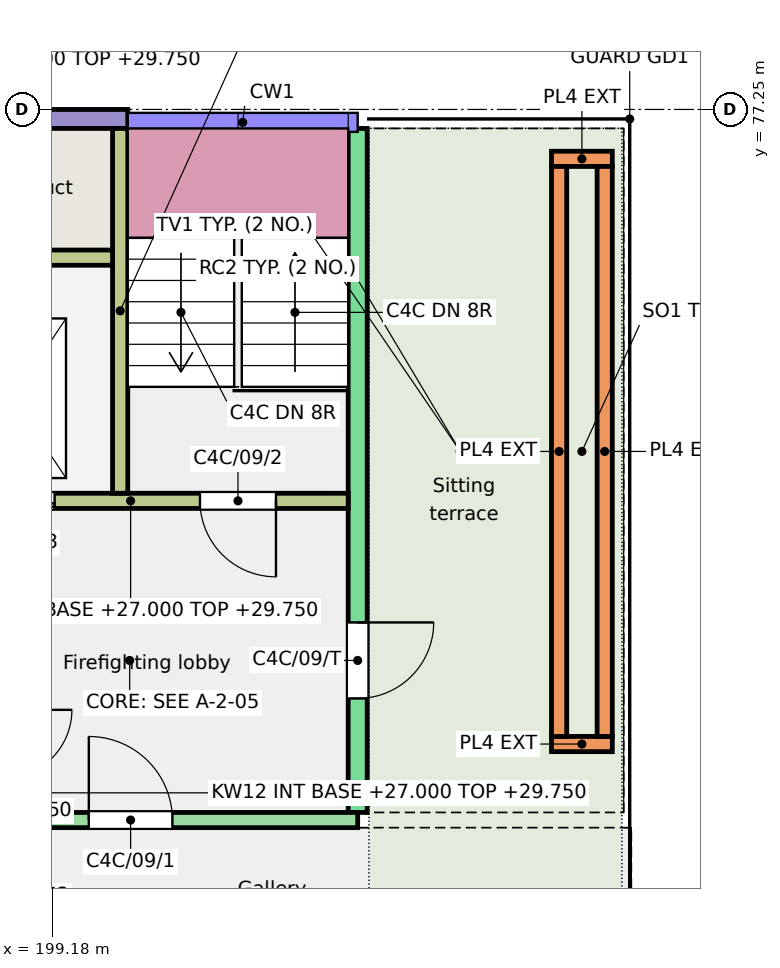
"""IFC4 building model, lengths in metres.
Left out: names, types, materials, properties, quantities, classifications, styles, units other than length and angle.
Written with IfcOpenShell. Run it as: python <this file> out.ifc"""

import sys

from ifc_helpers import new_model, si_unit, direction, frame, frame_2d, origin, place, context, subcontext, project, spatial, rectangle, extrude, element, fill, save


model = new_model("IFC4")
c1 = context("Model", 3, precision=1e-05, world=origin(), true_north=direction((0.0, 1.0)))
c2 = subcontext(c1, "Body", "Model", "MODEL_VIEW")
j1 = project(units=[si_unit("LENGTHUNIT", "METRE"), si_unit("PLANEANGLEUNIT", "RADIAN")], contexts=[c1])
p1 = place(None, origin())
s1 = spatial("IfcSite", under=j1, at=p1, CompositionType="ELEMENT")
p2 = place(p1, origin())
s2 = spatial("IfcBuilding", under=s1, at=p2, CompositionType="ELEMENT")
p3 = place(p2, frame((0.0, 0.0, 27.0)))
s3 = spatial("IfcBuildingStorey", under=s2, at=p3, CompositionType="ELEMENT", Elevation=27.0)
p4 = place(p3, frame((203.2, 68.0, 0.0), z_axis=(0.0, 0.0, 1.0), x_axis=(0.0, 1.0, 0.0)))
e1 = element("IfcWall", 1, at=p4, inside=s3, PredefinedType="SHEAR", context=c2, shape_type="SweptSolid", body=[
    extrude(rectangle(XDim=9.0, YDim=0.25, at=frame_2d((4.5, 0.0))), origin(), (0.0, 0.0, 1.0), 3.0),
])
p5 = place(p4, frame((1.5, 0.0, 0.0)))
e2 = element("IfcOpeningElement", 2, at=p5, cuts=e1, PredefinedType="OPENING", context=c2, shape_type="SweptSolid", body=[
    extrude(rectangle(XDim=1.0, YDim=2.1, at=frame_2d((0.5, 1.05))), frame((0.0, 0.135, 0.0), z_axis=(0.0, -1.0, 0.0), x_axis=(1.0, 0.0, 0.0)), (0.0, 0.0, 1.0), 0.27),
])
p6 = place(p3, frame((197.2, 77.125, 0.0), z_axis=(0.0, 0.0, 1.0), x_axis=(1.0, 0.0, 0.0)))
e3 = element("IfcWall", 3, at=p6, inside=s3, PredefinedType="SOLIDWALL", context=c2, shape_type="SweptSolid", body=[
    extrude(rectangle(XDim=2.975, YDim=0.25, at=frame_2d((1.488, 0.0))), origin(), (0.0, 0.0, 1.0), 3.0),
])
p7 = place(p3, frame((197.35, 67.9, 0.0), z_axis=(0.0, 0.0, 1.0), x_axis=(1.0, 0.0, 0.0)))
e4 = element("IfcWall", 4, at=p7, inside=s3, PredefinedType="SHEAR", context=c2, shape_type="SweptSolid", body=[
    extrude(rectangle(XDim=5.85, YDim=0.2, at=frame_2d((2.925, 0.0))), origin(), (0.0, 0.0, 1.0), 2.75),
])
p8 = place(p7, frame((2.312, 0.0, 0.0)))
e5 = element("IfcOpeningElement", 5, at=p8, cuts=e4, PredefinedType="OPENING", context=c2, shape_type="SweptSolid", body=[
    extrude(rectangle(XDim=1.1, YDim=2.1, at=frame_2d((0.55, 1.05))), frame((0.0, 0.11, 0.0), z_axis=(0.0, -1.0, 0.0), x_axis=(1.0, 0.0, 0.0)), (0.0, 0.0, 1.0), 0.22),
])
p9 = place(p3, frame((197.35, 72.1, 0.0), z_axis=(0.0, 0.0, 1.0), x_axis=(1.0, 0.0, 0.0)))
e6 = element("IfcWall", 6, at=p9, inside=s3, PredefinedType="SHEAR", context=c2, shape_type="SweptSolid", body=[
    extrude(rectangle(XDim=5.725, YDim=0.2, at=frame_2d((2.862, 0.0))), origin(), (0.0, 0.0, 1.0), 2.75),
])
p10 = place(p9, frame((3.775, 0.0, 0.0)))
e7 = element("IfcOpeningElement", 7, at=p10, cuts=e6, PredefinedType="OPENING", context=c2, shape_type="SweptSolid", body=[
    extrude(rectangle(XDim=1.0, YDim=2.1, at=frame_2d((0.5, 1.05))), frame((0.0, 0.11, 0.0), z_axis=(0.0, -1.0, 0.0), x_axis=(1.0, 0.0, 0.0)), (0.0, 0.0, 1.0), 0.22),
])
p11 = place(p9, frame((0.762, 0.0, 0.0)))
e8 = element("IfcOpeningElement", 8, at=p11, cuts=e6, PredefinedType="OPENING", context=c2, shape_type="SweptSolid", body=[
    extrude(rectangle(XDim=1.1, YDim=2.1, at=frame_2d((0.55, 1.05))), frame((0.0, 0.11, 0.0), z_axis=(0.0, -1.0, 0.0), x_axis=(1.0, 0.0, 0.0)), (0.0, 0.0, 1.0), 0.22),
])
p12 = place(p3, frame((200.075, 72.2, 0.0), z_axis=(0.0, 0.0, 1.0), x_axis=(0.0, 1.0, 0.0)))
e9 = element("IfcWall", 9, at=p12, inside=s3, PredefinedType="SHEAR", context=c2, shape_type="SweptSolid", body=[
    extrude(rectangle(XDim=4.8, YDim=0.2, at=frame_2d((2.4, 0.0))), origin(), (0.0, 0.0, 1.0), 2.75),
])
p13 = place(p3, frame((197.35, 75.3, 0.0), z_axis=(0.0, 0.0, 1.0), x_axis=(1.0, 0.0, 0.0)))
e10 = element("IfcWall", 10, at=p13, inside=s3, PredefinedType="SHEAR", context=c2, shape_type="SweptSolid", body=[
    extrude(rectangle(XDim=2.625, YDim=0.2, at=frame_2d((1.312, 0.0))), origin(), (0.0, 0.0, 1.0), 2.75),
])
for number, where, z_axis, x_axis in (
    (11, (205.75, 68.9, 0.01), (0.0, 0.0, 1.0), (1.0, 0.0, 0.0)),
    (12, (205.75, 76.6, 0.01), (0.0, 0.0, 1.0), (1.0, 0.0, 0.0)),
):
    element("IfcWall", number, at=place(p3, frame(where, z_axis=z_axis, x_axis=x_axis)), inside=s3, PredefinedType="SOLIDWALL", context=c2, shape_type="SweptSolid", body=[
        extrude(rectangle(XDim=0.8, YDim=0.2, at=frame_2d((0.4, 0.0))), origin(), (0.0, 0.0, 1.0), 0.45),
    ])
for number, where, z_axis, x_axis in (
    (13, (205.85, 69.0, 0.01), (0.0, 0.0, 1.0), (0.0, 1.0, 0.0)),
    (14, (206.45, 69.0, 0.01), (0.0, 0.0, 1.0), (0.0, 1.0, 0.0)),
):
    element("IfcWall", number, at=place(p3, frame(where, z_axis=z_axis, x_axis=x_axis)), inside=s3, PredefinedType="SOLIDWALL", context=c2, shape_type="SweptSolid", body=[
        extrude(rectangle(XDim=7.5, YDim=0.2, at=frame_2d((3.75, 0.0))), origin(), (0.0, 0.0, 1.0), 0.45),
    ])
p14 = place(p8, origin())
e15 = element("IfcDoor", 15, at=p14, inside=s3, OperationType="SINGLE_SWING_LEFT", PredefinedType="DOOR", context=c2, shape_type="SweptSolid", body=[
    extrude(rectangle(XDim=1.1, YDim=2.1, at=frame_2d((0.55, 1.05))), frame((0.0, 0.025, 0.0), z_axis=(0.0, -1.0, 0.0), x_axis=(1.0, 0.0, 0.0)), (0.0, 0.0, 1.0), 0.05),
])
fill(e5, e15)
p15 = place(p10, origin())
e16 = element("IfcDoor", 16, at=p15, inside=s3, OperationType="SINGLE_SWING_RIGHT", PredefinedType="DOOR", context=c2, shape_type="SweptSolid", body=[
    extrude(rectangle(XDim=1.0, YDim=2.1, at=frame_2d((0.5, 1.05))), frame((0.0, 0.025, 0.0), z_axis=(0.0, -1.0, 0.0), x_axis=(1.0, 0.0, 0.0)), (0.0, 0.0, 1.0), 0.05),
])
fill(e7, e16)
p16 = place(p11, origin())
e17 = element("IfcDoor", 17, at=p16, inside=s3, OperationType="DOUBLE_DOOR_SLIDING", PredefinedType="DOOR", context=c2, shape_type="SweptSolid", body=[
    extrude(rectangle(XDim=1.1, YDim=2.1, at=frame_2d((0.55, 1.05))), frame((0.0, 0.025, 0.0), z_axis=(0.0, -1.0, 0.0), x_axis=(1.0, 0.0, 0.0)), (0.0, 0.0, 1.0), 0.05),
])
fill(e8, e17)
p17 = place(p5, origin())
e18 = element("IfcDoor", 18, at=p17, inside=s3, OperationType="SINGLE_SWING_RIGHT", PredefinedType="DOOR", context=c2, shape_type="SweptSolid", body=[
    extrude(rectangle(XDim=1.0, YDim=2.1, at=frame_2d((0.5, 1.05))), frame((0.0, 0.025, 0.0), z_axis=(0.0, -1.0, 0.0), x_axis=(1.0, 0.0, 0.0)), (0.0, 0.0, 1.0), 0.05),
])
fill(e2, e18)
save(model, sys.argv[1])
